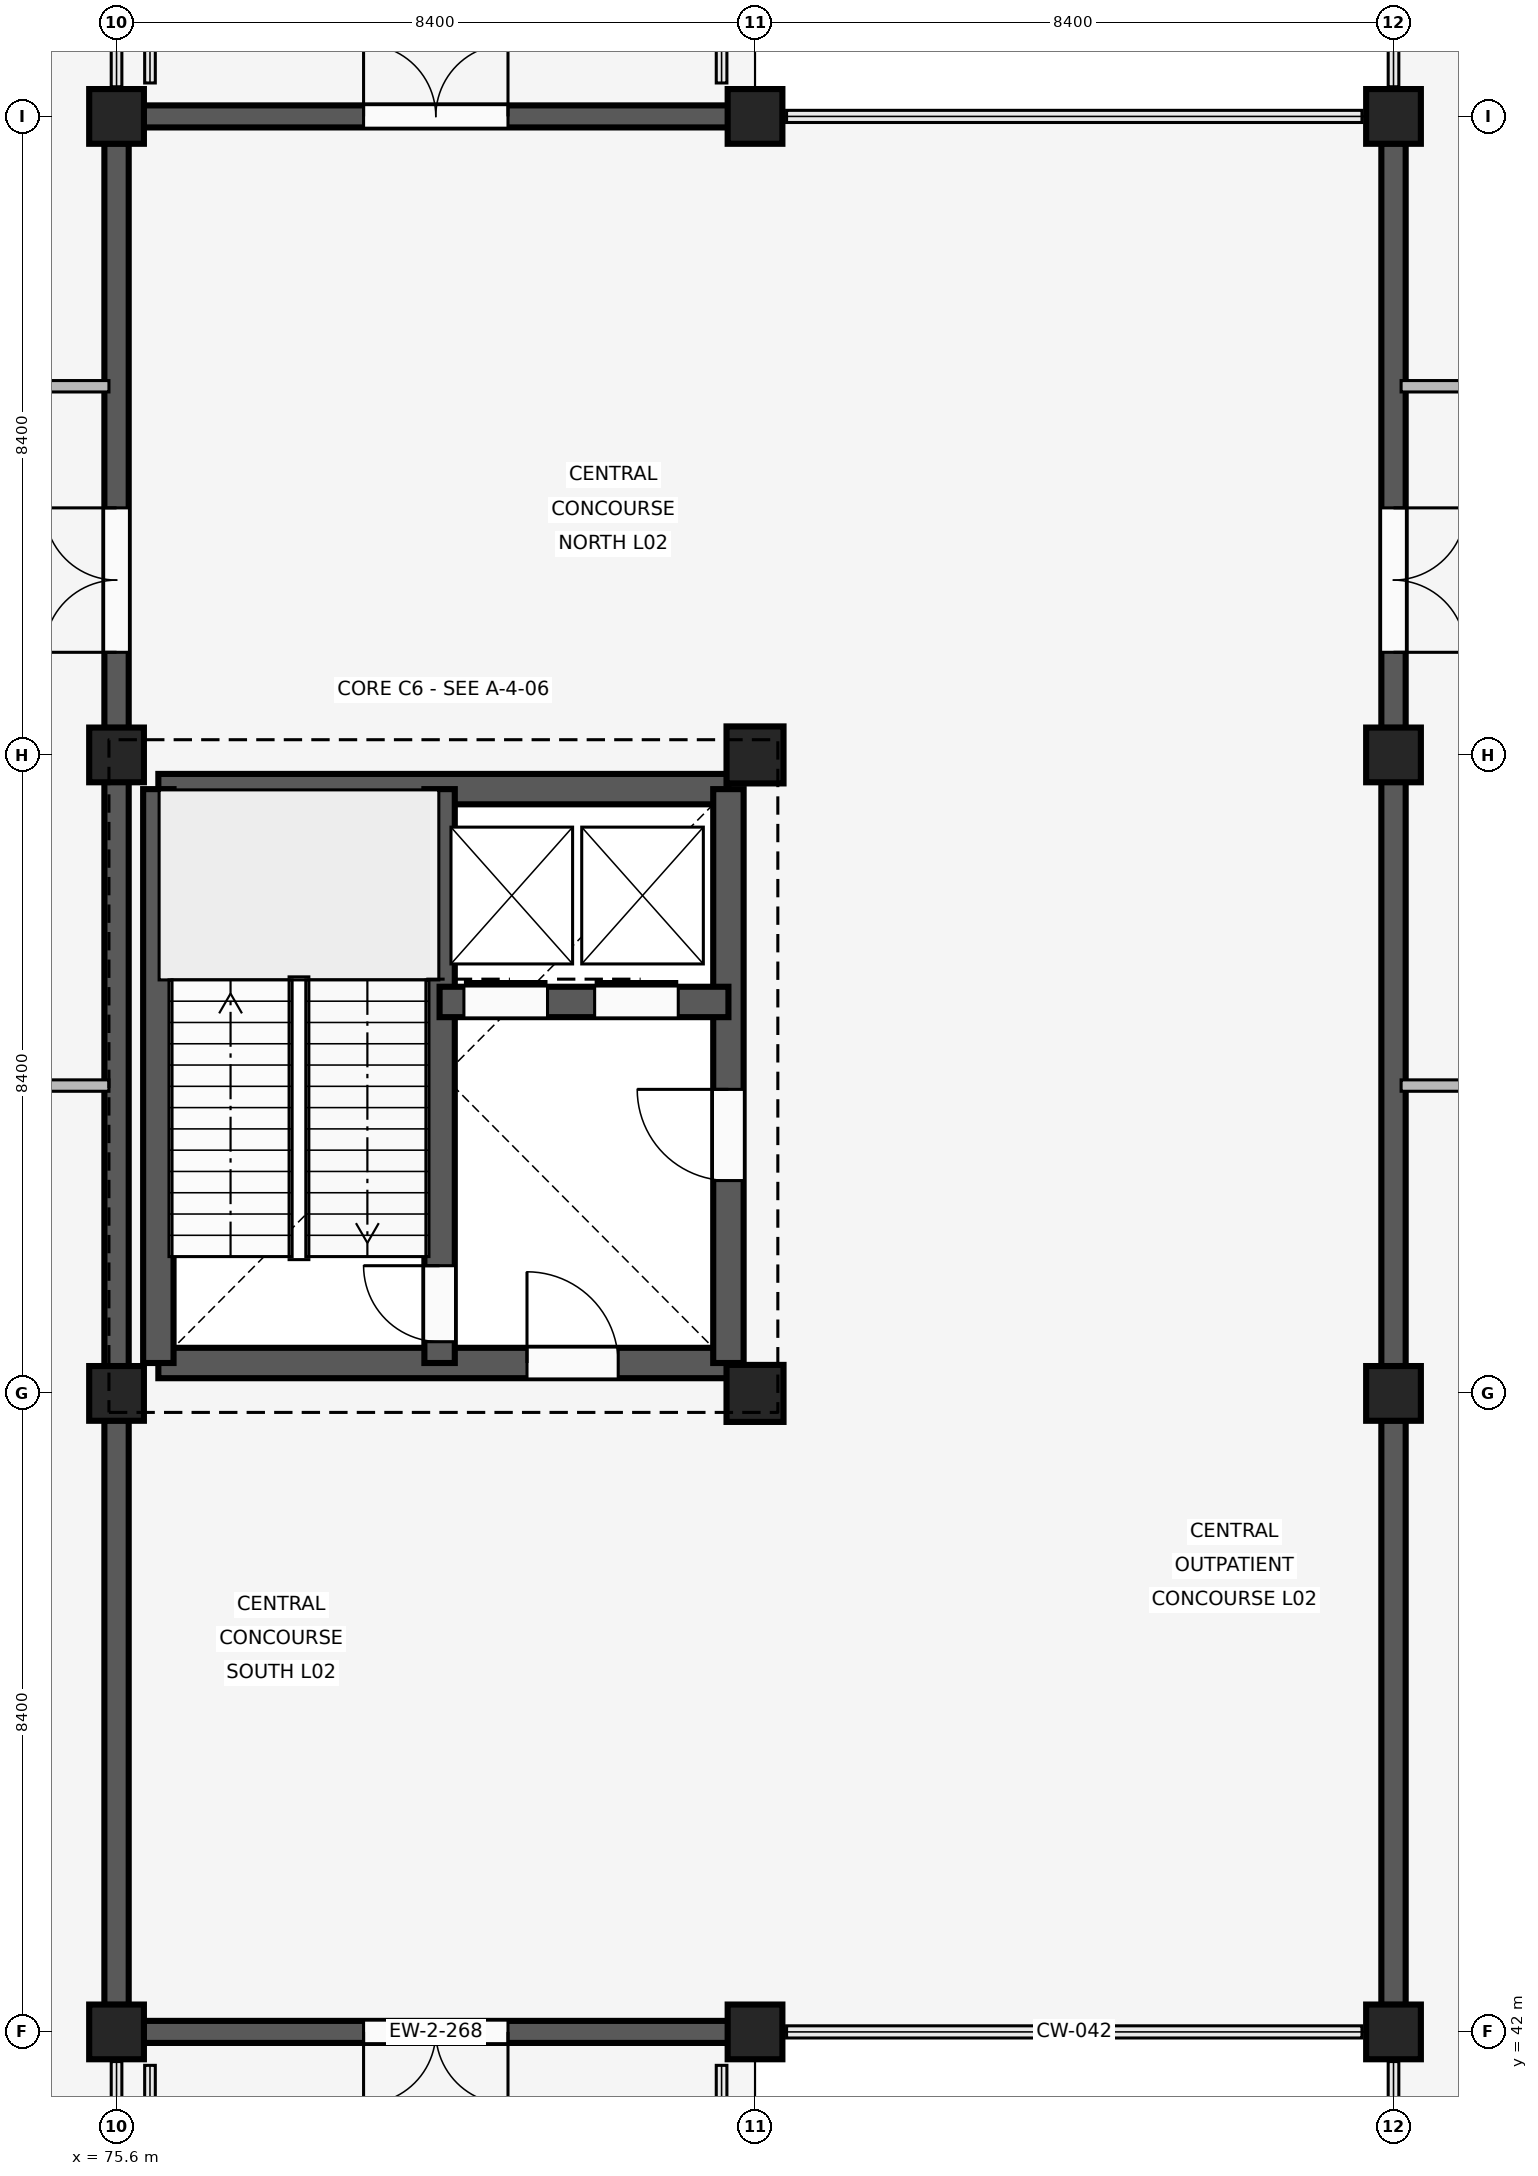
"""IFC4 building model, lengths in metres.
Left out: names, types, materials, properties, quantities, classifications, styles, units other than length and angle.
Written with IfcOpenShell. Run it as: python <this file> out.ifc"""

import sys

from ifc_helpers import new_model, si_unit, direction, frame, frame_2d, origin, origin_2d, place, context, subcontext, project, spatial, rectangle, extrude, element, fill, save


model = new_model("IFC4")
c1 = context("Model", 3, precision=1e-05, world=origin(), true_north=direction((0.0, 1.0)))
c2 = subcontext(c1, "Body", "Model", "MODEL_VIEW")
j1 = project(units=[si_unit("LENGTHUNIT", "METRE"), si_unit("PLANEANGLEUNIT", "RADIAN")], contexts=[c1])
p1 = place(None, origin())
s1 = spatial("IfcSite", under=j1, at=p1, CompositionType="ELEMENT")
p2 = place(p1, origin())
s2 = spatial("IfcBuilding", under=s1, at=p2, CompositionType="ELEMENT")
p3 = place(p2, frame((0.0, 0.0, 8.1)))
s3 = spatial("IfcBuildingStorey", under=s2, at=p3, CompositionType="ELEMENT", Elevation=8.1)
for number, where, z_axis, x_axis in (
    (1, (75.6, 42.0, 0.0), (0.0, 0.0, 1.0), (1.0, 0.0, 0.0)),
    (2, (75.6, 50.4, 0.0), (0.0, 0.0, 1.0), (1.0, 0.0, 0.0)),
    (3, (75.6, 58.8, 0.0), (0.0, 0.0, 1.0), (1.0, 0.0, 0.0)),
    (4, (75.6, 67.2, 0.0), (0.0, 0.0, 1.0), (1.0, 0.0, 0.0)),
    (5, (84.0, 42.0, 0.0), (0.0, 0.0, 1.0), (1.0, 0.0, 0.0)),
):
    element("IfcColumn", number, at=place(p3, frame(where, z_axis=z_axis, x_axis=x_axis)), inside=s3, PredefinedType="COLUMN", context=c2, shape_type="SweptSolid", body=[
        extrude(rectangle(XDim=0.72, YDim=0.72, at=origin_2d()), origin(), (0.0, 0.0, 1.0), 4.8),
    ])
for number, where, z_axis, x_axis in (
    (6, (84.0, 50.4, 0.0), (0.0, 0.0, 1.0), (1.0, 0.0, 0.0)),
    (7, (84.0, 58.8, 0.0), (0.0, 0.0, 1.0), (1.0, 0.0, 0.0)),
):
    element("IfcColumn", number, at=place(p3, frame(where, z_axis=z_axis, x_axis=x_axis)), inside=s3, PredefinedType="COLUMN", context=c2, shape_type="SweptSolid", body=[
        extrude(rectangle(XDim=0.75, YDim=0.75, at=origin_2d()), origin(), (0.0, 0.0, 1.0), 4.8),
    ])
for number, where, z_axis, x_axis in (
    (8, (84.0, 67.2, 0.0), (0.0, 0.0, 1.0), (1.0, 0.0, 0.0)),
    (9, (92.4, 42.0, 0.0), (0.0, 0.0, 1.0), (1.0, 0.0, 0.0)),
    (10, (92.4, 50.4, 0.0), (0.0, 0.0, 1.0), (1.0, 0.0, 0.0)),
    (11, (92.4, 58.8, 0.0), (0.0, 0.0, 1.0), (1.0, 0.0, 0.0)),
    (12, (92.4, 67.2, 0.0), (0.0, 0.0, 1.0), (1.0, 0.0, 0.0)),
):
    element("IfcColumn", number, at=place(p3, frame(where, z_axis=z_axis, x_axis=x_axis)), inside=s3, PredefinedType="COLUMN", context=c2, shape_type="SweptSolid", body=[
        extrude(rectangle(XDim=0.72, YDim=0.72, at=origin_2d()), origin(), (0.0, 0.0, 1.0), 4.8),
    ])
p4 = place(p3, frame((83.645, 42.0, 0.0), z_axis=(0.0, 0.0, 1.0), x_axis=(-1.0, 0.0, 0.0)))
e13 = element("IfcWall", 13, at=p4, inside=s3, PredefinedType="SOLIDWALL", context=c2, shape_type="SweptSolid", body=[
    extrude(rectangle(XDim=7.69, YDim=0.29, at=frame_2d((3.845, 0.0))), origin(), (0.0, 0.0, 1.0), 3.86),
])
p5 = place(p4, frame((2.895, 0.0, 0.0)))
e14 = element("IfcOpeningElement", 14, at=p5, cuts=e13, PredefinedType="OPENING", context=c2, shape_type="SweptSolid", body=[
    extrude(rectangle(XDim=1.9, YDim=2.4, at=frame_2d((0.95, 1.2))), frame((0.0, 0.155, 0.0), z_axis=(0.0, -1.0, 0.0), x_axis=(1.0, 0.0, 0.0)), (0.0, 0.0, 1.0), 0.31),
])
p6 = place(p3, frame((75.6, 42.355, 0.0), z_axis=(0.0, 0.0, 1.0), x_axis=(0.0, 1.0, 0.0)))
e15 = element("IfcWall", 15, at=p6, inside=s3, PredefinedType="SOLIDWALL", context=c2, shape_type="SweptSolid", body=[
    extrude(rectangle(XDim=7.69, YDim=0.32, at=frame_2d((3.845, 0.0))), origin(), (0.0, 0.0, 1.0), 3.86),
])
p7 = place(p3, frame((75.6, 50.755, 0.0), z_axis=(0.0, 0.0, 1.0), x_axis=(0.0, 1.0, 0.0)))
e16 = element("IfcWall", 16, at=p7, inside=s3, PredefinedType="SOLIDWALL", context=c2, shape_type="SweptSolid", body=[
    extrude(rectangle(XDim=7.69, YDim=0.32, at=frame_2d((3.845, 0.0))), origin(), (0.0, 0.0, 1.0), 3.86),
])
p8 = place(p3, frame((75.955, 67.2, 0.0), z_axis=(0.0, 0.0, 1.0), x_axis=(1.0, 0.0, 0.0)))
e17 = element("IfcWall", 17, at=p8, inside=s3, PredefinedType="SOLIDWALL", context=c2, shape_type="SweptSolid", body=[
    extrude(rectangle(XDim=7.69, YDim=0.29, at=frame_2d((3.845, 0.0))), origin(), (0.0, 0.0, 1.0), 3.86),
])
p9 = place(p8, frame((2.895, 0.0, 0.0)))
e18 = element("IfcOpeningElement", 18, at=p9, cuts=e17, PredefinedType="OPENING", context=c2, shape_type="SweptSolid", body=[
    extrude(rectangle(XDim=1.9, YDim=2.4, at=frame_2d((0.95, 1.2))), frame((0.0, 0.155, 0.0), z_axis=(0.0, -1.0, 0.0), x_axis=(1.0, 0.0, 0.0)), (0.0, 0.0, 1.0), 0.31),
])
p10 = place(p3, frame((75.6, 59.155, 0.0), z_axis=(0.0, 0.0, 1.0), x_axis=(0.0, 1.0, 0.0)))
e19 = element("IfcWall", 19, at=p10, inside=s3, PredefinedType="SOLIDWALL", context=c2, shape_type="SweptSolid", body=[
    extrude(rectangle(XDim=7.69, YDim=0.32, at=frame_2d((3.845, 0.0))), origin(), (0.0, 0.0, 1.0), 3.86),
])
p11 = place(p10, frame((0.995, 0.0, 0.0)))
e20 = element("IfcOpeningElement", 20, at=p11, cuts=e19, PredefinedType="OPENING", context=c2, shape_type="SweptSolid", body=[
    extrude(rectangle(XDim=1.9, YDim=2.4, at=frame_2d((0.95, 1.2))), frame((0.0, 0.17, 0.0), z_axis=(0.0, -1.0, 0.0), x_axis=(1.0, 0.0, 0.0)), (0.0, 0.0, 1.0), 0.34),
])
p12 = place(p3, frame((92.4, 50.045, 0.0), z_axis=(0.0, 0.0, 1.0), x_axis=(0.0, -1.0, 0.0)))
e21 = element("IfcWall", 21, at=p12, inside=s3, PredefinedType="SOLIDWALL", context=c2, shape_type="SweptSolid", body=[
    extrude(rectangle(XDim=7.69, YDim=0.32, at=frame_2d((3.845, 0.0))), origin(), (0.0, 0.0, 1.0), 3.86),
])
p13 = place(p3, frame((92.4, 58.445, 0.0), z_axis=(0.0, 0.0, 1.0), x_axis=(0.0, -1.0, 0.0)))
e22 = element("IfcWall", 22, at=p13, inside=s3, PredefinedType="SOLIDWALL", context=c2, shape_type="SweptSolid", body=[
    extrude(rectangle(XDim=7.69, YDim=0.32, at=frame_2d((3.845, 0.0))), origin(), (0.0, 0.0, 1.0), 3.86),
])
p14 = place(p3, frame((92.4, 66.845, 0.0), z_axis=(0.0, 0.0, 1.0), x_axis=(0.0, -1.0, 0.0)))
e23 = element("IfcWall", 23, at=p14, inside=s3, PredefinedType="SOLIDWALL", context=c2, shape_type="SweptSolid", body=[
    extrude(rectangle(XDim=7.69, YDim=0.32, at=frame_2d((3.845, 0.0))), origin(), (0.0, 0.0, 1.0), 3.86),
])
p15 = place(p14, frame((4.795, 0.0, 0.0)))
e24 = element("IfcOpeningElement", 24, at=p15, cuts=e23, PredefinedType="OPENING", context=c2, shape_type="SweptSolid", body=[
    extrude(rectangle(XDim=1.9, YDim=2.4, at=frame_2d((0.95, 1.2))), frame((0.0, 0.17, 0.0), z_axis=(0.0, -1.0, 0.0), x_axis=(1.0, 0.0, 0.0)), (0.0, 0.0, 1.0), 0.34),
])
p16 = place(p3, frame((76.15, 50.8, 0.0), z_axis=(0.0, 0.0, 1.0), x_axis=(1.0, 0.0, 0.0)))
e25 = element("IfcWall", 25, at=p16, inside=s3, PredefinedType="SHEAR", context=c2, shape_type="SweptSolid", body=[
    extrude(rectangle(XDim=7.5, YDim=0.4, at=frame_2d((3.75, 0.0))), origin(), (0.0, 0.0, 1.0), 4.52),
])
p17 = place(p16, frame((4.85, 0.0, 0.0)))
e26 = element("IfcOpeningElement", 26, at=p17, cuts=e25, PredefinedType="OPENING", context=c2, shape_type="SweptSolid", body=[
    extrude(rectangle(XDim=1.2, YDim=2.2, at=frame_2d((0.6, 1.1))), frame((0.0, 0.21, 0.0), z_axis=(0.0, -1.0, 0.0), x_axis=(1.0, 0.0, 0.0)), (0.0, 0.0, 1.0), 0.42),
])
p18 = place(p3, frame((76.15, 58.35, 0.0), z_axis=(0.0, 0.0, 1.0), x_axis=(1.0, 0.0, 0.0)))
e27 = element("IfcWall", 27, at=p18, inside=s3, PredefinedType="SHEAR", context=c2, shape_type="SweptSolid", body=[
    extrude(rectangle(XDim=7.5, YDim=0.4, at=frame_2d((3.75, 0.0))), origin(), (0.0, 0.0, 1.0), 4.52),
])
p19 = place(p3, frame((76.15, 50.8, 0.0), z_axis=(0.0, 0.0, 1.0), x_axis=(0.0, 1.0, 0.0)))
e28 = element("IfcWall", 28, at=p19, inside=s3, PredefinedType="SHEAR", context=c2, shape_type="SweptSolid", body=[
    extrude(rectangle(XDim=7.55, YDim=0.4, at=frame_2d((3.775, 0.0))), origin(), (0.0, 0.0, 1.0), 4.52),
])
p20 = place(p3, frame((83.65, 50.8, 0.0), z_axis=(0.0, 0.0, 1.0), x_axis=(0.0, 1.0, 0.0)))
e29 = element("IfcWall", 29, at=p20, inside=s3, PredefinedType="SHEAR", context=c2, shape_type="SweptSolid", body=[
    extrude(rectangle(XDim=7.55, YDim=0.4, at=frame_2d((3.775, 0.0))), origin(), (0.0, 0.0, 1.0), 4.52),
])
p21 = place(p20, frame((2.4, 0.0, 0.0)))
e30 = element("IfcOpeningElement", 30, at=p21, cuts=e29, PredefinedType="OPENING", context=c2, shape_type="SweptSolid", body=[
    extrude(rectangle(XDim=1.2, YDim=2.2, at=frame_2d((0.6, 1.1))), frame((0.0, 0.21, 0.0), z_axis=(0.0, -1.0, 0.0), x_axis=(1.0, 0.0, 0.0)), (0.0, 0.0, 1.0), 0.42),
])
p22 = place(p3, frame((79.85, 50.8, 0.0), z_axis=(0.0, 0.0, 1.0), x_axis=(0.0, 1.0, 0.0)))
e31 = element("IfcWall", 31, at=p22, inside=s3, PredefinedType="SHEAR", context=c2, shape_type="SweptSolid", body=[
    extrude(rectangle(XDim=7.55, YDim=0.4, at=frame_2d((3.775, 0.0))), origin(), (0.0, 0.0, 1.0), 4.52),
])
p23 = place(p22, frame((0.28, 0.0, 0.0)))
e32 = element("IfcOpeningElement", 32, at=p23, cuts=e31, PredefinedType="OPENING", context=c2, shape_type="SweptSolid", body=[
    extrude(rectangle(XDim=1.0, YDim=2.15, at=frame_2d((0.5, 1.075))), frame((0.0, 0.21, 0.0), z_axis=(0.0, -1.0, 0.0), x_axis=(1.0, 0.0, 0.0)), (0.0, 0.0, 1.0), 0.42),
])
p24 = place(p3, frame((79.85, 55.55, 0.0), z_axis=(0.0, 0.0, 1.0), x_axis=(1.0, 0.0, 0.0)))
e33 = element("IfcWall", 33, at=p24, inside=s3, PredefinedType="SHEAR", context=c2, shape_type="SweptSolid", body=[
    extrude(rectangle(XDim=3.8, YDim=0.4, at=frame_2d((1.9, 0.0))), origin(), (0.0, 0.0, 1.0), 4.52),
])
p25 = place(p24, frame((0.32, 0.0, 0.0)))
e34 = element("IfcOpeningElement", 34, at=p25, cuts=e33, PredefinedType="OPENING", context=c2, shape_type="SweptSolid", body=[
    extrude(rectangle(XDim=1.1, YDim=2.15, at=frame_2d((0.55, 1.075))), frame((0.0, 0.21, 0.0), z_axis=(0.0, -1.0, 0.0), x_axis=(1.0, 0.0, 0.0)), (0.0, 0.0, 1.0), 0.42),
])
p26 = place(p24, frame((2.04, 0.0, 0.0)))
e35 = element("IfcOpeningElement", 35, at=p26, cuts=e33, PredefinedType="OPENING", context=c2, shape_type="SweptSolid", body=[
    extrude(rectangle(XDim=1.1, YDim=2.15, at=frame_2d((0.55, 1.075))), frame((0.0, 0.21, 0.0), z_axis=(0.0, -1.0, 0.0), x_axis=(1.0, 0.0, 0.0)), (0.0, 0.0, 1.0), 0.42),
])
p27 = place(p3, frame((53.3, 54.45, 0.0), z_axis=(0.0, 0.0, 1.0), x_axis=(1.0, 0.0, 0.0)))
e36 = element("IfcWall", 36, at=p27, inside=s3, PredefinedType="PARTITIONING", context=c2, shape_type="SweptSolid", body=[
    extrude(rectangle(XDim=22.2, YDim=0.15, at=frame_2d((11.1, 0.0))), origin(), (0.0, 0.0, 1.0), 4.09),
])
p28 = place(p27, frame((2.6, 0.0, 0.0)))
e37 = element("IfcOpeningElement", 37, at=p28, cuts=e36, PredefinedType="OPENING", context=c2, shape_type="SweptSolid", body=[
    extrude(rectangle(XDim=1.0, YDim=2.15, at=frame_2d((0.5, 1.075))), frame((0.0, 0.085, 0.0), z_axis=(0.0, -1.0, 0.0), x_axis=(1.0, 0.0, 0.0)), (0.0, 0.0, 1.0), 0.17),
])
p29 = place(p3, frame((53.3, 63.65, 0.0), z_axis=(0.0, 0.0, 1.0), x_axis=(1.0, 0.0, 0.0)))
e38 = element("IfcWall", 38, at=p29, inside=s3, PredefinedType="PARTITIONING", context=c2, shape_type="SweptSolid", body=[
    extrude(rectangle(XDim=22.2, YDim=0.15, at=frame_2d((11.1, 0.0))), origin(), (0.0, 0.0, 1.0), 4.09),
])
p30 = place(p29, frame((2.6, 0.0, 0.0)))
e39 = element("IfcOpeningElement", 39, at=p30, cuts=e38, PredefinedType="OPENING", context=c2, shape_type="SweptSolid", body=[
    extrude(rectangle(XDim=1.05, YDim=2.2, at=frame_2d((0.525, 1.1))), frame((0.0, 0.085, 0.0), z_axis=(0.0, -1.0, 0.0), x_axis=(1.0, 0.0, 0.0)), (0.0, 0.0, 1.0), 0.17),
])
p31 = place(p3, frame((92.5, 54.45, 0.0), z_axis=(0.0, 0.0, 1.0), x_axis=(1.0, 0.0, 0.0)))
e40 = element("IfcWall", 40, at=p31, inside=s3, PredefinedType="PARTITIONING", context=c2, shape_type="SweptSolid", body=[
    extrude(rectangle(XDim=22.2, YDim=0.15, at=frame_2d((11.1, 0.0))), origin(), (0.0, 0.0, 1.0), 4.09),
])
p32 = place(p31, frame((2.6, 0.0, 0.0)))
e41 = element("IfcOpeningElement", 41, at=p32, cuts=e40, PredefinedType="OPENING", context=c2, shape_type="SweptSolid", body=[
    extrude(rectangle(XDim=1.0, YDim=2.15, at=frame_2d((0.5, 1.075))), frame((0.0, 0.085, 0.0), z_axis=(0.0, -1.0, 0.0), x_axis=(1.0, 0.0, 0.0)), (0.0, 0.0, 1.0), 0.17),
])
p33 = place(p3, frame((92.5, 63.65, 0.0), z_axis=(0.0, 0.0, 1.0), x_axis=(1.0, 0.0, 0.0)))
e42 = element("IfcWall", 42, at=p33, inside=s3, PredefinedType="PARTITIONING", context=c2, shape_type="SweptSolid", body=[
    extrude(rectangle(XDim=22.2, YDim=0.15, at=frame_2d((11.1, 0.0))), origin(), (0.0, 0.0, 1.0), 4.09),
])
p34 = place(p33, frame((2.6, 0.0, 0.0)))
e43 = element("IfcOpeningElement", 43, at=p34, cuts=e42, PredefinedType="OPENING", context=c2, shape_type="SweptSolid", body=[
    extrude(rectangle(XDim=1.05, YDim=2.2, at=frame_2d((0.525, 1.1))), frame((0.0, 0.085, 0.0), z_axis=(0.0, -1.0, 0.0), x_axis=(1.0, 0.0, 0.0)), (0.0, 0.0, 1.0), 0.17),
])
p35 = place(p5, origin())
e44 = element("IfcDoor", 44, at=p35, inside=s3, OperationType="DOUBLE_SWING_LEFT", PredefinedType="DOOR", context=c2, shape_type="SweptSolid", body=[
    extrude(rectangle(XDim=1.9, YDim=2.4, at=frame_2d((0.95, 1.2))), frame((0.0, 0.025, 0.0), z_axis=(0.0, -1.0, 0.0), x_axis=(1.0, 0.0, 0.0)), (0.0, 0.0, 1.0), 0.05),
])
fill(e14, e44)
p36 = place(p9, origin())
e45 = element("IfcDoor", 45, at=p36, inside=s3, OperationType="DOUBLE_SWING_LEFT", PredefinedType="DOOR", context=c2, shape_type="SweptSolid", body=[
    extrude(rectangle(XDim=1.9, YDim=2.4, at=frame_2d((0.95, 1.2))), frame((0.0, 0.025, 0.0), z_axis=(0.0, -1.0, 0.0), x_axis=(1.0, 0.0, 0.0)), (0.0, 0.0, 1.0), 0.05),
])
fill(e18, e45)
p37 = place(p11, origin())
e46 = element("IfcDoor", 46, at=p37, inside=s3, OperationType="DOUBLE_SWING_LEFT", PredefinedType="DOOR", context=c2, shape_type="SweptSolid", body=[
    extrude(rectangle(XDim=1.9, YDim=2.4, at=frame_2d((0.95, 1.2))), frame((0.0, 0.025, 0.0), z_axis=(0.0, -1.0, 0.0), x_axis=(1.0, 0.0, 0.0)), (0.0, 0.0, 1.0), 0.05),
])
fill(e20, e46)
p38 = place(p15, origin())
e47 = element("IfcDoor", 47, at=p38, inside=s3, OperationType="DOUBLE_SWING_LEFT", PredefinedType="DOOR", context=c2, shape_type="SweptSolid", body=[
    extrude(rectangle(XDim=1.9, YDim=2.4, at=frame_2d((0.95, 1.2))), frame((0.0, 0.025, 0.0), z_axis=(0.0, -1.0, 0.0), x_axis=(1.0, 0.0, 0.0)), (0.0, 0.0, 1.0), 0.05),
])
fill(e24, e47)
p39 = place(p21, origin())
e48 = element("IfcDoor", 48, at=p39, inside=s3, OperationType="SINGLE_SWING_RIGHT", PredefinedType="DOOR", context=c2, shape_type="SweptSolid", body=[
    extrude(rectangle(XDim=1.2, YDim=2.2, at=frame_2d((0.6, 1.1))), frame((0.0, 0.025, 0.0), z_axis=(0.0, -1.0, 0.0), x_axis=(1.0, 0.0, 0.0)), (0.0, 0.0, 1.0), 0.05),
])
fill(e30, e48)
p40 = place(p17, origin())
e49 = element("IfcDoor", 49, at=p40, inside=s3, OperationType="SINGLE_SWING_LEFT", PredefinedType="DOOR", context=c2, shape_type="SweptSolid", body=[
    extrude(rectangle(XDim=1.2, YDim=2.2, at=frame_2d((0.6, 1.1))), frame((0.0, 0.025, 0.0), z_axis=(0.0, -1.0, 0.0), x_axis=(1.0, 0.0, 0.0)), (0.0, 0.0, 1.0), 0.05),
])
fill(e26, e49)
p41 = place(p23, origin())
e50 = element("IfcDoor", 50, at=p41, inside=s3, OperationType="SINGLE_SWING_RIGHT", PredefinedType="DOOR", context=c2, shape_type="SweptSolid", body=[
    extrude(rectangle(XDim=1.0, YDim=2.15, at=frame_2d((0.5, 1.075))), frame((0.0, 0.025, 0.0), z_axis=(0.0, -1.0, 0.0), x_axis=(1.0, 0.0, 0.0)), (0.0, 0.0, 1.0), 0.05),
])
fill(e32, e50)
p42 = place(p25, origin())
e51 = element("IfcDoor", 51, at=p42, inside=s3, OperationType="SLIDING_TO_LEFT", PredefinedType="DOOR", context=c2, shape_type="SweptSolid", body=[
    extrude(rectangle(XDim=1.1, YDim=2.15, at=frame_2d((0.55, 1.075))), frame((0.0, 0.025, 0.0), z_axis=(0.0, -1.0, 0.0), x_axis=(1.0, 0.0, 0.0)), (0.0, 0.0, 1.0), 0.05),
])
fill(e34, e51)
p43 = place(p26, origin())
e52 = element("IfcDoor", 52, at=p43, inside=s3, OperationType="SLIDING_TO_LEFT", PredefinedType="DOOR", context=c2, shape_type="SweptSolid", body=[
    extrude(rectangle(XDim=1.1, YDim=2.15, at=frame_2d((0.55, 1.075))), frame((0.0, 0.025, 0.0), z_axis=(0.0, -1.0, 0.0), x_axis=(1.0, 0.0, 0.0)), (0.0, 0.0, 1.0), 0.05),
])
fill(e35, e52)
save(model, sys.argv[1])
